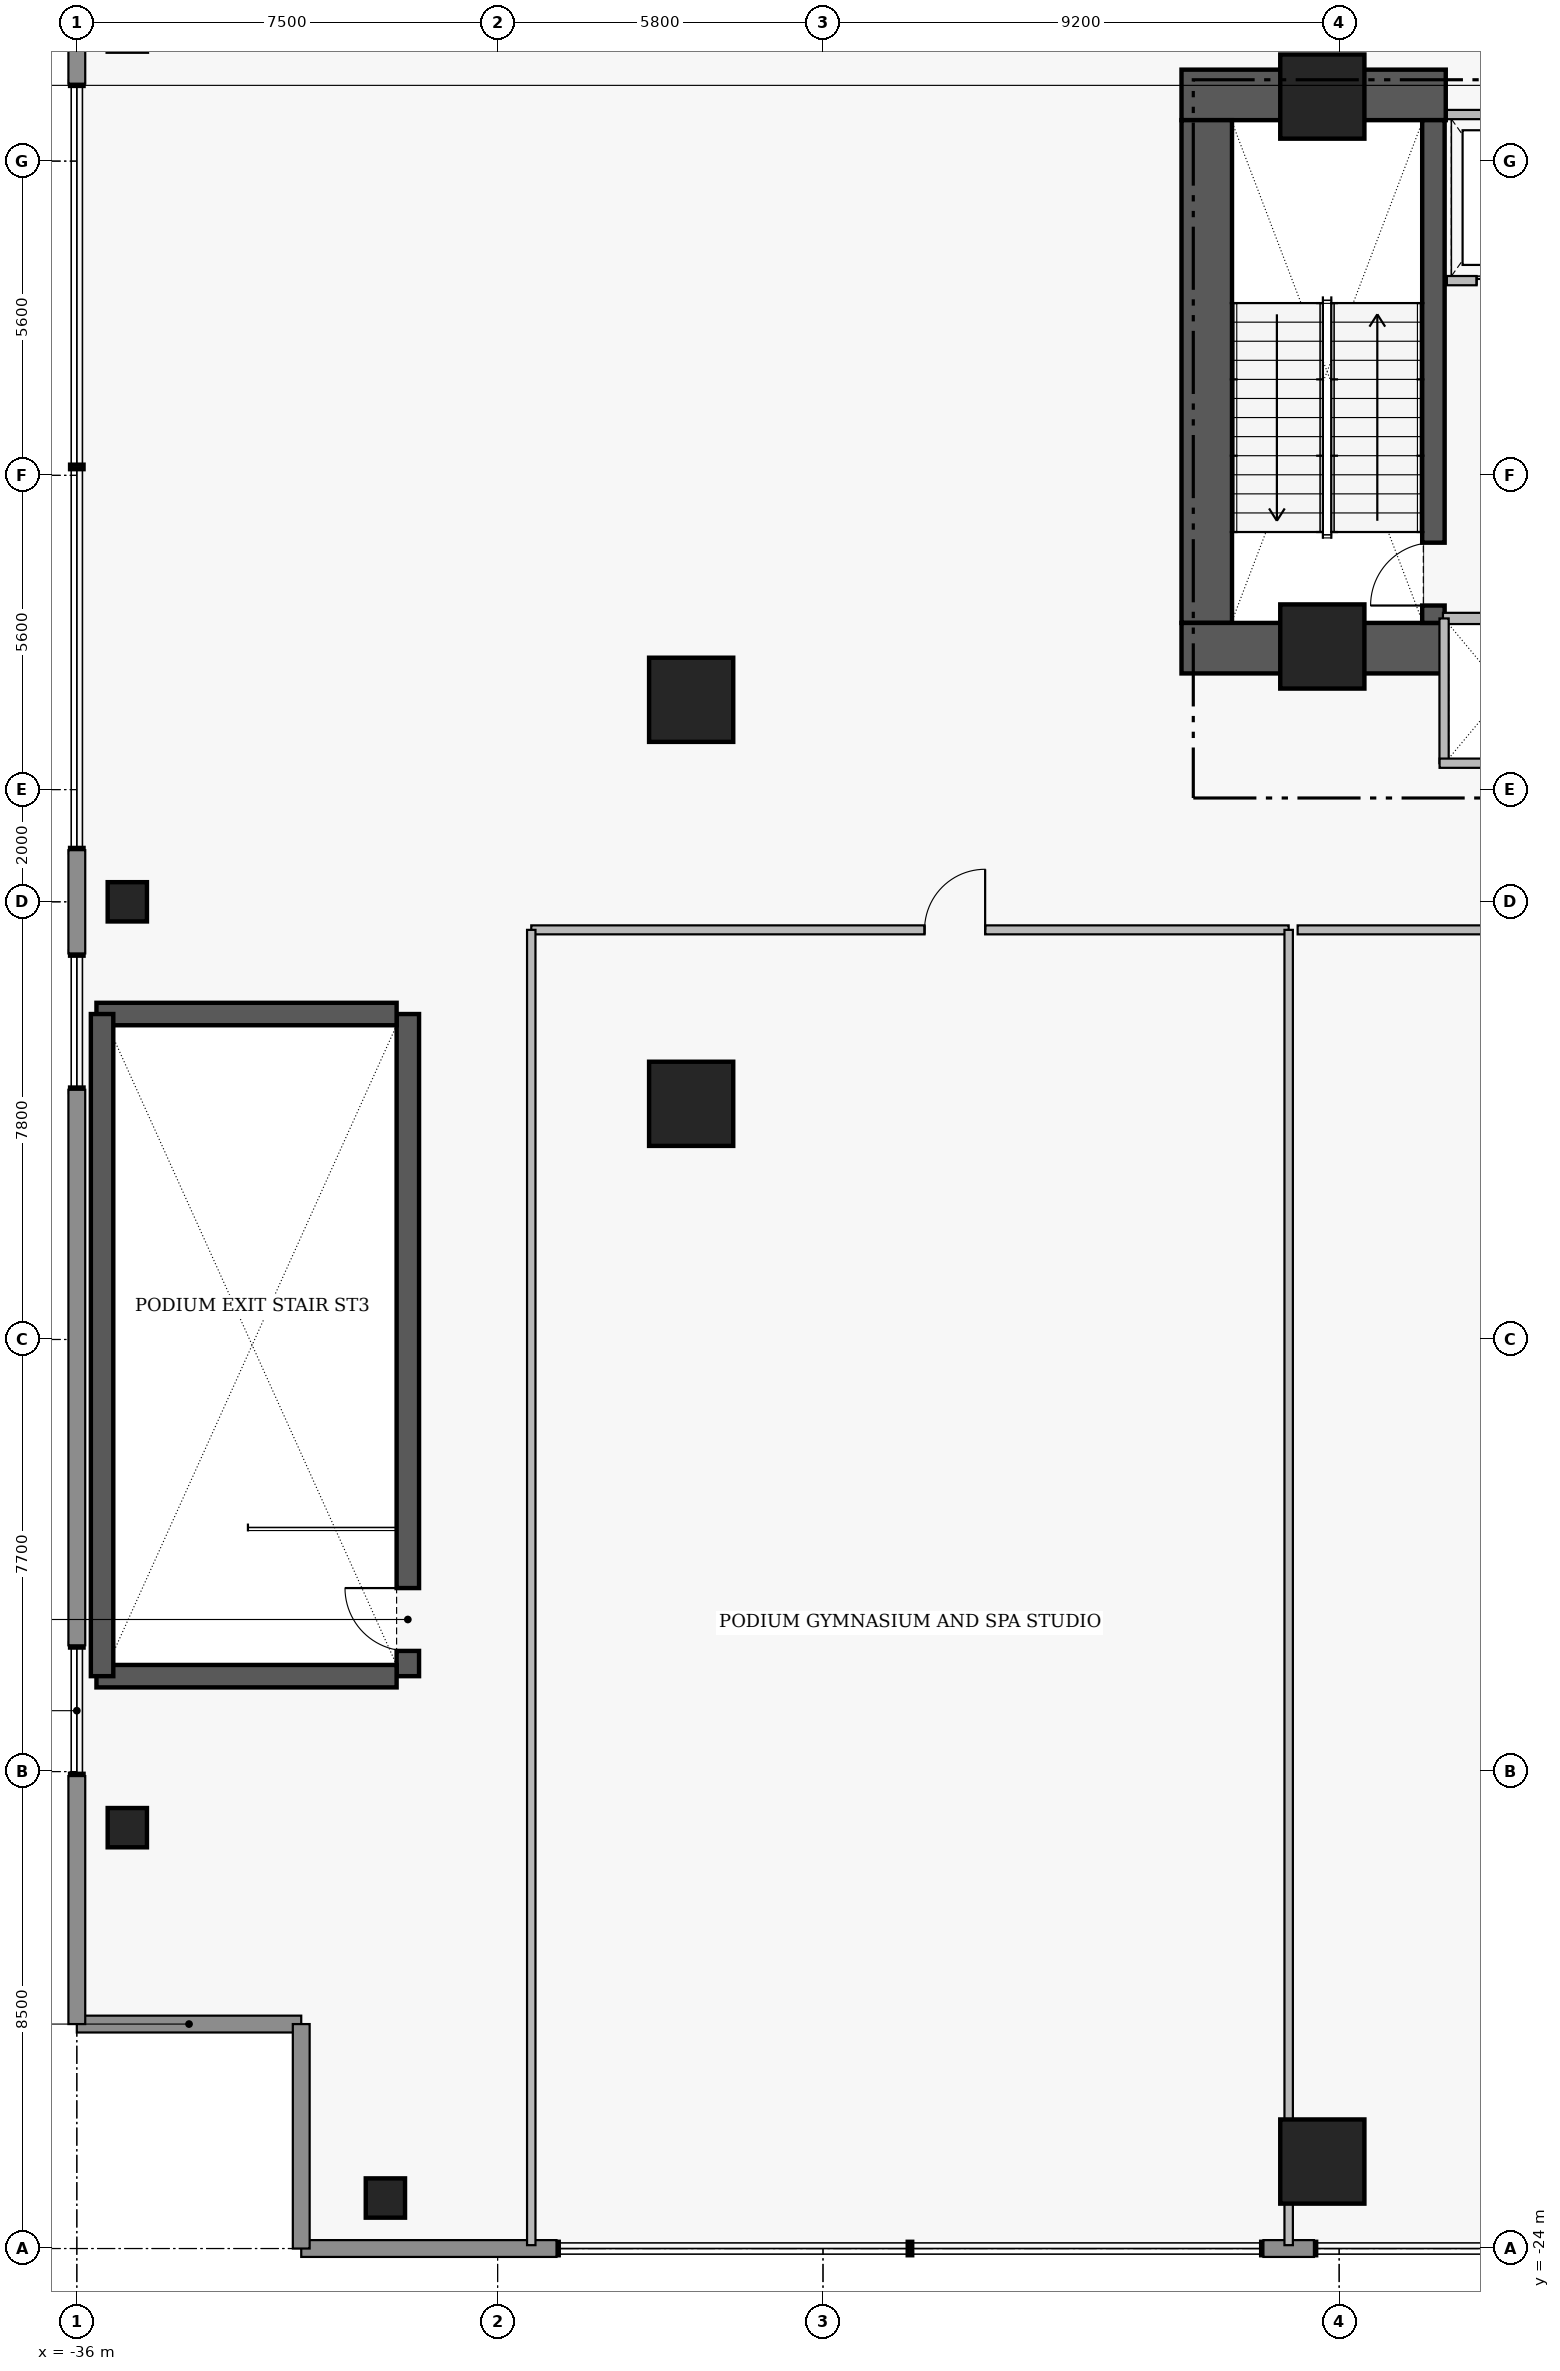
"""IFC4 building model, lengths in metres.
Left out: names, types, materials, properties, quantities, classifications, styles, units other than length and angle.
Written with IfcOpenShell. Run it as: python <this file> out.ifc"""

import sys

from ifc_helpers import new_model, si_unit, direction, frame, frame_2d, origin, origin_2d, place, context, subcontext, project, spatial, rectangle, extrude, element, fill, save


model = new_model("IFC4")
c1 = context("Model", 3, precision=1e-05, world=origin(), true_north=direction((0.0, 1.0)))
c2 = subcontext(c1, "Body", "Model", "MODEL_VIEW")
j1 = project(units=[si_unit("LENGTHUNIT", "METRE"), si_unit("PLANEANGLEUNIT", "RADIAN")], contexts=[c1])
p1 = place(None, origin())
s1 = spatial("IfcSite", under=j1, at=p1, CompositionType="ELEMENT")
p2 = place(p1, origin())
s2 = spatial("IfcBuilding", under=s1, at=p2, CompositionType="ELEMENT")
p3 = place(p2, frame((0.0, 0.0, 22.8)))
s3 = spatial("IfcBuildingStorey", under=s2, at=p3, CompositionType="ELEMENT", Elevation=22.8)
p4 = place(p3, frame((-16.31, 14.38, 0.0), z_axis=(0.0, 0.0, 1.0), x_axis=(1.0, 0.0, 0.0)))
e1 = element("IfcWall", 1, at=p4, inside=s3, PredefinedType="SHEAR", context=c2, shape_type="SweptSolid", body=[
    extrude(rectangle(XDim=4.71, YDim=0.9, at=frame_2d((2.355, 0.0))), origin(), (0.0, 0.0, 1.0), 4.61),
])
p5 = place(p3, frame((-15.86, 4.97, 0.0), z_axis=(0.0, 0.0, 1.0), x_axis=(0.0, 1.0, 0.0)))
e2 = element("IfcWall", 2, at=p5, inside=s3, PredefinedType="SHEAR", context=c2, shape_type="SweptSolid", body=[
    extrude(rectangle(XDim=8.96, YDim=0.9, at=frame_2d((4.48, 0.0))), origin(), (0.0, 0.0, 1.0), 4.61),
])
p6 = place(p3, frame((-16.31, 4.52, 0.0), z_axis=(0.0, 0.0, 1.0), x_axis=(1.0, 0.0, 0.0)))
e3 = element("IfcWall", 3, at=p6, inside=s3, PredefinedType="SHEAR", context=c2, shape_type="SweptSolid", body=[
    extrude(rectangle(XDim=4.71, YDim=0.9, at=frame_2d((2.355, 0.0))), origin(), (0.0, 0.0, 1.0), 4.61),
])
p7 = place(p3, frame((-11.82, 4.97, 0.0), z_axis=(0.0, 0.0, 1.0), x_axis=(0.0, 1.0, 0.0)))
e4 = element("IfcWall", 4, at=p7, inside=s3, PredefinedType="SHEAR", context=c2, shape_type="SweptSolid", body=[
    extrude(rectangle(XDim=8.96, YDim=0.4, at=frame_2d((4.48, 0.0))), origin(), (0.0, 0.0, 1.0), 4.61),
])
p8 = place(p7, frame((0.31, 0.0, 0.0)))
e5 = element("IfcOpeningElement", 5, at=p8, cuts=e4, PredefinedType="OPENING", context=c2, shape_type="SweptSolid", body=[
    extrude(rectangle(XDim=1.12, YDim=2.22, at=frame_2d((0.56, 1.11))), frame((0.0, 0.21, 0.0), z_axis=(0.0, -1.0, 0.0), x_axis=(1.0, 0.0, 0.0)), (0.0, 0.0, 1.0), 0.42),
])
p9 = place(p3, frame((-30.1, -13.8, 0.0), z_axis=(0.0, 0.0, 1.0), x_axis=(0.0, 1.0, 0.0)))
e6 = element("IfcWall", 6, at=p9, inside=s3, PredefinedType="SHEAR", context=c2, shape_type="SweptSolid", body=[
    extrude(rectangle(XDim=11.8, YDim=0.4, at=frame_2d((5.9, 0.0))), origin(), (0.0, 0.0, 1.0), 4.61),
])
p10 = place(p9, frame((0.45, 0.0, 0.0)))
e7 = element("IfcOpeningElement", 7, at=p10, cuts=e6, PredefinedType="OPENING", context=c2, shape_type="SweptSolid", body=[
    extrude(rectangle(XDim=1.12, YDim=2.22, at=frame_2d((0.56, 1.11))), frame((0.0, 0.21, 0.0), z_axis=(0.0, -1.0, 0.0), x_axis=(1.0, 0.0, 0.0)), (0.0, 0.0, 1.0), 0.42),
])
for number, where, z_axis, x_axis in (
    (8, (-35.65, -13.8, 0.0), (0.0, 0.0, 1.0), (1.0, 0.0, 0.0)),
    (9, (-35.65, -2.0, 0.0), (0.0, 0.0, 1.0), (1.0, 0.0, 0.0)),
):
    element("IfcWall", number, at=place(p3, frame(where, z_axis=z_axis, x_axis=x_axis)), inside=s3, PredefinedType="SHEAR", context=c2, shape_type="SweptSolid", body=[
        extrude(rectangle(XDim=5.35, YDim=0.4, at=frame_2d((2.675, 0.0))), origin(), (0.0, 0.0, 1.0), 4.61),
    ])
p11 = place(p3, frame((-35.55, -13.8, 0.0), z_axis=(0.0, 0.0, 1.0), x_axis=(0.0, 1.0, 0.0)))
e10 = element("IfcWall", 10, at=p11, inside=s3, PredefinedType="SHEAR", context=c2, shape_type="SweptSolid", body=[
    extrude(rectangle(XDim=11.8, YDim=0.4, at=frame_2d((5.9, 0.0))), origin(), (0.0, 0.0, 1.0), 4.61),
])
for number, where, z_axis, x_axis in (
    (11, (-13.8, 14.35, 0.0), (0.0, 0.0, 1.0), (1.0, 0.0, 0.0)),
    (12, (-13.8, 4.55, 0.0), (0.0, 0.0, 1.0), (1.0, 0.0, 0.0)),
    (13, (-13.8, -22.45, 0.0), (0.0, 0.0, 1.0), (1.0, 0.0, 0.0)),
    (14, (-25.05, -3.6, 0.0), (0.0, 0.0, 1.0), (1.0, 0.0, 0.0)),
    (15, (-25.05, 3.6, 0.0), (0.0, 0.0, 1.0), (1.0, 0.0, 0.0)),
):
    element("IfcColumn", number, at=place(p3, frame(where, z_axis=z_axis, x_axis=x_axis)), inside=s3, PredefinedType="COLUMN", context=c2, shape_type="SweptSolid", body=[
        extrude(rectangle(XDim=1.5, YDim=1.5, at=origin_2d()), origin(), (0.0, 0.0, 1.0), 4.8),
    ])
for number, where, z_axis, x_axis in (
    (16, (-30.5, -23.1, 0.0), (0.0, 0.0, 1.0), (1.0, 0.0, 0.0)),
    (17, (-35.1, -16.5, 0.0), (0.0, 0.0, 1.0), (1.0, 0.0, 0.0)),
    (18, (-35.1, 0.0, 0.0), (0.0, 0.0, 1.0), (1.0, 0.0, 0.0)),
):
    element("IfcColumn", number, at=place(p3, frame(where, z_axis=z_axis, x_axis=x_axis)), inside=s3, PredefinedType="COLUMN", context=c2, shape_type="SweptSolid", body=[
        extrude(rectangle(XDim=0.7, YDim=0.7, at=origin_2d()), origin(), (0.0, 0.0, 1.0), 4.8),
    ])
p12 = place(p3, frame((-32.0, -20.0, 0.0), z_axis=(0.0, 0.0, 1.0), x_axis=(-1.0, 0.0, 0.0)))
e19 = element("IfcWall", 19, at=p12, inside=s3, PredefinedType="STANDARD", context=c2, shape_type="SweptSolid", body=[
    extrude(rectangle(XDim=4.0, YDim=0.3, at=frame_2d((2.0, 0.0))), origin(), (0.0, 0.0, 1.0), 4.58),
])
p13 = place(p3, frame((-36.0, -20.0, 0.0), z_axis=(0.0, 0.0, 1.0), x_axis=(0.0, 1.0, 0.0)))
e20 = element("IfcWall", 20, at=p13, inside=s3, PredefinedType="STANDARD", context=c2, shape_type="SweptSolid", body=[
    extrude(rectangle(XDim=4.42, YDim=0.3, at=frame_2d((2.21, 0.0))), origin(), (0.0, 0.0, 1.0), 4.58),
])
p14 = place(p3, frame((-36.0, -13.25, 0.0), z_axis=(0.0, 0.0, 1.0), x_axis=(0.0, 1.0, 0.0)))
e21 = element("IfcWall", 21, at=p14, inside=s3, PredefinedType="STANDARD", context=c2, shape_type="SweptSolid", body=[
    extrude(rectangle(XDim=9.9, YDim=0.3, at=frame_2d((4.95, 0.0))), origin(), (0.0, 0.0, 1.0), 4.58),
])
p15 = place(p3, frame((-36.0, -0.92, 0.0), z_axis=(0.0, 0.0, 1.0), x_axis=(0.0, 1.0, 0.0)))
e22 = element("IfcWall", 22, at=p15, inside=s3, PredefinedType="STANDARD", context=c2, shape_type="SweptSolid", body=[
    extrude(rectangle(XDim=1.84, YDim=0.3, at=frame_2d((0.92, 0.0))), origin(), (0.0, 0.0, 1.0), 4.58),
])
p16 = place(p3, frame((-36.0, 14.58, 0.0), z_axis=(0.0, 0.0, 1.0), x_axis=(0.0, 1.0, 0.0)))
e23 = element("IfcWall", 23, at=p16, inside=s3, PredefinedType="STANDARD", context=c2, shape_type="SweptSolid", body=[
    extrude(rectangle(XDim=4.42, YDim=0.3, at=frame_2d((2.21, 0.0))), origin(), (0.0, 0.0, 1.0), 4.58),
])
p17 = place(p3, frame((-13.95, -24.0, 0.0), z_axis=(0.0, 0.0, 1.0), x_axis=(-1.0, 0.0, 0.0)))
e24 = element("IfcWall", 24, at=p17, inside=s3, PredefinedType="STANDARD", context=c2, shape_type="SweptSolid", body=[
    extrude(rectangle(XDim=0.9, YDim=0.3, at=frame_2d((0.45, 0.0))), origin(), (0.0, 0.0, 1.0), 4.58),
])
p18 = place(p3, frame((-27.45, -24.0, 0.0), z_axis=(0.0, 0.0, 1.0), x_axis=(-1.0, 0.0, 0.0)))
e25 = element("IfcWall", 25, at=p18, inside=s3, PredefinedType="STANDARD", context=c2, shape_type="SweptSolid", body=[
    extrude(rectangle(XDim=4.55, YDim=0.3, at=frame_2d((2.275, 0.0))), origin(), (0.0, 0.0, 1.0), 4.58),
])
p19 = place(p3, frame((-32.0, -24.0, 0.0), z_axis=(0.0, 0.0, 1.0), x_axis=(0.0, 1.0, 0.0)))
e26 = element("IfcWall", 26, at=p19, inside=s3, PredefinedType="STANDARD", context=c2, shape_type="SweptSolid", body=[
    extrude(rectangle(XDim=4.0, YDim=0.3, at=frame_2d((2.0, 0.0))), origin(), (0.0, 0.0, 1.0), 4.58),
])
p20 = place(p3, frame((-11.58, 11.07, 0.0), z_axis=(0.0, 0.0, 1.0), x_axis=(1.0, 0.0, 0.0)))
e27 = element("IfcWall", 27, at=p20, inside=s3, PredefinedType="PARTITIONING", context=c2, shape_type="SweptSolid", body=[
    extrude(rectangle(XDim=2.16, YDim=0.165, at=frame_2d((1.08, 0.0))), origin(), (0.0, 0.0, 1.0), 4.58),
])
p21 = place(p20, frame((0.53, 0.0, 0.0)))
e28 = element("IfcOpeningElement", 28, at=p21, cuts=e27, PredefinedType="OPENING", context=c2, shape_type="SweptSolid", body=[
    extrude(rectangle(XDim=1.15, YDim=2.25, at=frame_2d((0.575, 1.125))), frame((0.0, 0.093, 0.0), z_axis=(0.0, -1.0, 0.0), x_axis=(1.0, 0.0, 0.0)), (0.0, 0.0, 1.0), 0.185),
])
p22 = place(p3, frame((-27.9, -0.5, 0.0), z_axis=(0.0, 0.0, 1.0), x_axis=(1.0, 0.0, 0.0)))
e29 = element("IfcWall", 29, at=p22, inside=s3, PredefinedType="PARTITIONING", context=c2, shape_type="SweptSolid", body=[
    extrude(rectangle(XDim=13.5, YDim=0.16, at=frame_2d((6.75, 0.0))), origin(), (0.0, 0.0, 1.0), 4.58),
])
p23 = place(p22, frame((7.01, 0.0, 0.0)))
e30 = element("IfcOpeningElement", 30, at=p23, cuts=e29, PredefinedType="OPENING", context=c2, shape_type="SweptSolid", body=[
    extrude(rectangle(XDim=1.08, YDim=2.18, at=frame_2d((0.54, 1.09))), frame((0.0, 0.09, 0.0), z_axis=(0.0, -1.0, 0.0), x_axis=(1.0, 0.0, 0.0)), (0.0, 0.0, 1.0), 0.18),
])
p24 = place(p3, frame((-14.24, -0.5, 0.0), z_axis=(0.0, 0.0, 1.0), x_axis=(1.0, 0.0, 0.0)))
e31 = element("IfcWall", 31, at=p24, inside=s3, PredefinedType="PARTITIONING", context=c2, shape_type="SweptSolid", body=[
    extrude(rectangle(XDim=28.48, YDim=0.16, at=frame_2d((14.24, 0.0))), origin(), (0.0, 0.0, 1.0), 4.58),
])
p25 = place(p24, frame((13.7, 0.0, 0.0)))
e32 = element("IfcOpeningElement", 32, at=p25, cuts=e31, PredefinedType="OPENING", context=c2, shape_type="SweptSolid", body=[
    extrude(rectangle(XDim=1.08, YDim=2.18, at=frame_2d((0.54, 1.09))), frame((0.0, 0.09, 0.0), z_axis=(0.0, -1.0, 0.0), x_axis=(1.0, 0.0, 0.0)), (0.0, 0.0, 1.0), 0.18),
])
p26 = place(p3, frame((-11.65, 5.05, 0.0), z_axis=(0.0, 0.0, 1.0), x_axis=(1.0, 0.0, 0.0)))
e33 = element("IfcWall", 33, at=p26, inside=s3, PredefinedType="PARTITIONING", context=c2, shape_type="SweptSolid", body=[
    extrude(rectangle(XDim=2.85, YDim=0.2, at=frame_2d((1.425, 0.0))), origin(), (0.0, 0.0, 1.0), 4.58),
])
p27 = place(p3, frame((-11.58, 14.03, 0.0), z_axis=(0.0, 0.0, 1.0), x_axis=(1.0, 0.0, 0.0)))
e34 = element("IfcWall", 34, at=p27, inside=s3, PredefinedType="PARTITIONING", context=c2, shape_type="SweptSolid", body=[
    extrude(rectangle(XDim=2.16, YDim=0.165, at=frame_2d((1.08, 0.0))), origin(), (0.0, 0.0, 1.0), 4.58),
])
p28 = place(p3, frame((-11.63, 2.47, 0.0), z_axis=(0.0, 0.0, 1.0), x_axis=(0.0, 1.0, 0.0)))
e35 = element("IfcWall", 35, at=p28, inside=s3, PredefinedType="PARTITIONING", context=c2, shape_type="SweptSolid", body=[
    extrude(rectangle(XDim=2.58, YDim=0.165, at=frame_2d((1.29, 0.0))), origin(), (0.0, 0.0, 1.0), 4.58),
])
p29 = place(p3, frame((-11.71, 2.47, 0.0), z_axis=(0.0, 0.0, 1.0), x_axis=(1.0, 0.0, 0.0)))
e36 = element("IfcWall", 36, at=p29, inside=s3, PredefinedType="PARTITIONING", context=c2, shape_type="SweptSolid", body=[
    extrude(rectangle(XDim=2.31, YDim=0.165, at=frame_2d((1.155, 0.0))), origin(), (0.0, 0.0, 1.0), 3.18),
])
for number, where, z_axis, x_axis in (
    (37, (-27.9, -23.94, 0.0), (0.0, 0.0, 1.0), (0.0, 1.0, 0.0)),
    (38, (-14.4, -23.94, 0.0), (0.0, 0.0, 1.0), (0.0, 1.0, 0.0)),
):
    element("IfcWall", number, at=place(p3, frame(where, z_axis=z_axis, x_axis=x_axis)), inside=s3, PredefinedType="PARTITIONING", context=c2, shape_type="SweptSolid", body=[
        extrude(rectangle(XDim=23.44, YDim=0.15, at=frame_2d((11.72, 0.0))), origin(), (0.0, 0.0, 1.0), 4.58),
    ])
p30 = place(p8, origin())
e39 = element("IfcDoor", 39, at=p30, inside=s3, OperationType="SINGLE_SWING_LEFT", PredefinedType="DOOR", context=c2, shape_type="SweptSolid", body=[
    extrude(rectangle(XDim=1.12, YDim=2.22, at=frame_2d((0.56, 1.11))), frame((0.0, 0.025, 0.0), z_axis=(0.0, -1.0, 0.0), x_axis=(1.0, 0.0, 0.0)), (0.0, 0.0, 1.0), 0.05),
])
fill(e5, e39)
p31 = place(p10, origin())
e40 = element("IfcDoor", 40, at=p31, inside=s3, OperationType="SINGLE_SWING_RIGHT", PredefinedType="DOOR", context=c2, shape_type="SweptSolid", body=[
    extrude(rectangle(XDim=1.12, YDim=2.22, at=frame_2d((0.56, 1.11))), frame((0.0, 0.025, 0.0), z_axis=(0.0, -1.0, 0.0), x_axis=(1.0, 0.0, 0.0)), (0.0, 0.0, 1.0), 0.05),
])
fill(e7, e40)
p32 = place(p21, origin())
e41 = element("IfcDoor", 41, at=p32, inside=s3, OperationType="SLIDING_TO_LEFT", PredefinedType="DOOR", context=c2, shape_type="SweptSolid", body=[
    extrude(rectangle(XDim=1.15, YDim=2.25, at=frame_2d((0.575, 1.125))), frame((0.0, 0.025, 0.0), z_axis=(0.0, -1.0, 0.0), x_axis=(1.0, 0.0, 0.0)), (0.0, 0.0, 1.0), 0.05),
])
fill(e28, e41)
p33 = place(p23, origin())
e42 = element("IfcDoor", 42, at=p33, inside=s3, OperationType="SINGLE_SWING_RIGHT", PredefinedType="DOOR", context=c2, shape_type="SweptSolid", body=[
    extrude(rectangle(XDim=1.08, YDim=2.18, at=frame_2d((0.54, 1.09))), frame((0.0, 0.025, 0.0), z_axis=(0.0, -1.0, 0.0), x_axis=(1.0, 0.0, 0.0)), (0.0, 0.0, 1.0), 0.05),
])
fill(e30, e42)
save(model, sys.argv[1])
